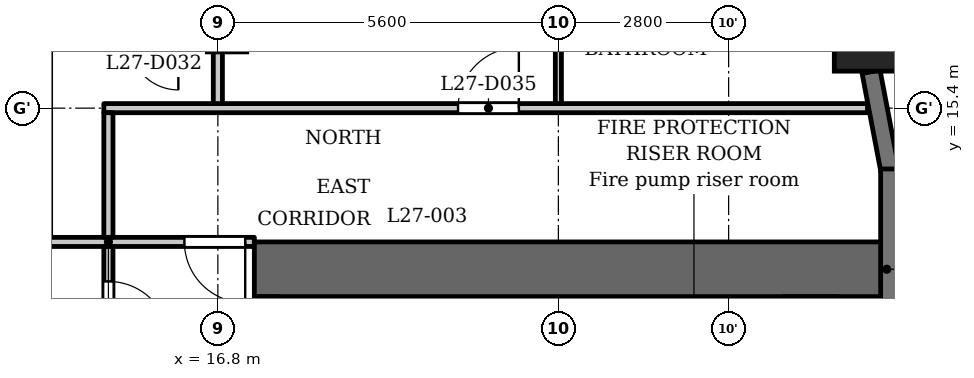
"""IFC4 building model, lengths in metres.
Left out: names, types, materials, properties, quantities, classifications, styles, units other than length and angle.
Written with IfcOpenShell. Run it as: python <this file> out.ifc"""

import sys

from ifc_helpers import new_model, si_unit, direction, frame, frame_2d, origin, origin_2d, place, context, subcontext, project, spatial, rectangle, extrude, element, fill, save


model = new_model("IFC4")
c1 = context("Model", 3, precision=1e-05, world=origin(), true_north=direction((0.0, 1.0)))
c2 = subcontext(c1, "Body", "Model", "MODEL_VIEW")
j1 = project(units=[si_unit("LENGTHUNIT", "METRE"), si_unit("PLANEANGLEUNIT", "RADIAN")], contexts=[c1])
p1 = place(None, origin())
s1 = spatial("IfcSite", under=j1, at=p1, CompositionType="ELEMENT")
p2 = place(p1, origin())
s2 = spatial("IfcBuilding", under=s1, at=p2, CompositionType="ELEMENT")
p3 = place(p2, frame((0.0, 0.0, 107.8)))
s3 = spatial("IfcBuildingStorey", under=s2, at=p3, CompositionType="ELEMENT", Elevation=107.8)
p4 = place(p3, frame((27.538, 16.609, 0.0), z_axis=(0.0, 0.0, 1.0), x_axis=(1.0, 0.0, 0.0)))
e1 = element("IfcColumn", 1, at=p4, inside=s3, PredefinedType="COLUMN", context=c2, shape_type="SweptSolid", body=[
    extrude(rectangle(XDim=1.2, YDim=1.2, at=origin_2d()), origin(), (0.0, 0.0, 1.0), 3.5),
])
p5 = place(p3, frame((16.8, 16.8, 0.0), z_axis=(0.0, 0.0, 1.0), x_axis=(1.0, 0.0, 0.0)))
e2 = element("IfcColumn", 2, at=p5, inside=s3, PredefinedType="COLUMN", context=c2, shape_type="SweptSolid", body=[
    extrude(rectangle(XDim=0.95, YDim=0.95, at=origin_2d()), origin(), (0.0, 0.0, 1.0), 3.5),
])
p6 = place(p3, frame((27.85, 11.8, 0.0), z_axis=(0.0, 0.0, 1.0), x_axis=(0.0, 1.0, 0.0)))
e3 = element("IfcWall", 3, at=p6, inside=s3, PredefinedType="SOLIDWALL", context=c2, shape_type="SweptSolid", body=[
    extrude(rectangle(XDim=2.6, YDim=0.3, at=frame_2d((1.3, 0.0))), origin(), (0.0, 0.0, 1.0), 2.4),
])
p7 = place(p3, frame((27.853, 14.372, 0.0), z_axis=(0.0, 0.0, 1.0), x_axis=(-0.187349172861, 0.982293381546, 0.0)))
e4 = element("IfcWall", 4, at=p7, inside=s3, PredefinedType="SOLIDWALL", context=c2, shape_type="SweptSolid", body=[
    extrude(rectangle(XDim=1.656, YDim=0.3, at=frame_2d((0.828, 0.0))), origin(), (0.0, 0.0, 1.0), 2.4),
])
p8 = place(p3, frame((17.4, 12.75, 0.0), z_axis=(0.0, 0.0, 1.0), x_axis=(1.0, 0.0, 0.0)))
e5 = element("IfcWall", 5, at=p8, inside=s3, PredefinedType="SHEAR", context=c2, shape_type="SweptSolid", body=[
    extrude(rectangle(XDim=10.4, YDim=0.9, at=frame_2d((5.2, 0.0))), origin(), (0.0, 0.0, 1.0), 3.2),
])
p9 = place(p3, frame((17.6, -12.3, 0.0), z_axis=(0.0, 0.0, 1.0), x_axis=(0.0, 1.0, 0.0)))
e6 = element("IfcWall", 6, at=p9, inside=s3, PredefinedType="SHEAR", context=c2, shape_type="SweptSolid", body=[
    extrude(rectangle(XDim=24.6, YDim=0.4, at=frame_2d((12.3, 0.0))), origin(), (0.0, 0.0, 1.0), 3.2),
])
p10 = place(p9, frame((6.0, 0.0, 0.0)))
e7 = element("IfcOpeningElement", 7, at=p10, cuts=e6, PredefinedType="OPENING", context=c2, shape_type="SweptSolid", body=[
    extrude(rectangle(XDim=1.1, YDim=2.1, at=frame_2d((0.55, 1.05))), frame((0.0, 0.21, 0.0), z_axis=(0.0, -1.0, 0.0), x_axis=(1.0, 0.0, 0.0)), (0.0, 0.0, 1.0), 0.42),
])
p11 = place(p9, frame((8.4, 0.0, 0.0)))
e8 = element("IfcOpeningElement", 8, at=p11, cuts=e6, PredefinedType="OPENING", context=c2, shape_type="SweptSolid", body=[
    extrude(rectangle(XDim=1.1, YDim=2.1, at=frame_2d((0.55, 1.05))), frame((0.0, 0.21, 0.0), z_axis=(0.0, -1.0, 0.0), x_axis=(1.0, 0.0, 0.0)), (0.0, 0.0, 1.0), 0.42),
])
p12 = place(p9, frame((10.8, 0.0, 0.0)))
e9 = element("IfcOpeningElement", 9, at=p12, cuts=e6, PredefinedType="OPENING", context=c2, shape_type="SweptSolid", body=[
    extrude(rectangle(XDim=1.1, YDim=2.1, at=frame_2d((0.55, 1.05))), frame((0.0, 0.21, 0.0), z_axis=(0.0, -1.0, 0.0), x_axis=(1.0, 0.0, 0.0)), (0.0, 0.0, 1.0), 0.42),
])
p13 = place(p9, frame((16.75, 0.0, 0.0)))
e10 = element("IfcOpeningElement", 10, at=p13, cuts=e6, PredefinedType="OPENING", context=c2, shape_type="SweptSolid", body=[
    extrude(rectangle(XDim=0.9, YDim=2.1, at=frame_2d((0.45, 1.05))), frame((0.0, 0.21, 0.0), z_axis=(0.0, -1.0, 0.0), x_axis=(1.0, 0.0, 0.0)), (0.0, 0.0, 1.0), 0.42),
])
p14 = place(p9, frame((22.8, 0.0, 0.0)))
e11 = element("IfcOpeningElement", 11, at=p14, cuts=e6, PredefinedType="OPENING", context=c2, shape_type="SweptSolid", body=[
    extrude(rectangle(XDim=1.1, YDim=2.1, at=frame_2d((0.55, 1.05))), frame((0.0, 0.21, 0.0), z_axis=(0.0, -1.0, 0.0), x_axis=(1.0, 0.0, 0.0)), (0.0, 0.0, 1.0), 0.42),
])
p15 = place(p9, frame((0.7, 0.0, 0.0)))
e12 = element("IfcOpeningElement", 12, at=p15, cuts=e6, PredefinedType="OPENING", context=c2, shape_type="SweptSolid", body=[
    extrude(rectangle(XDim=1.1, YDim=2.1, at=frame_2d((0.55, 1.05))), frame((0.0, 0.21, 0.0), z_axis=(0.0, -1.0, 0.0), x_axis=(1.0, 0.0, 0.0)), (0.0, 0.0, 1.0), 0.42),
])
p16 = place(p9, frame((12.775, 0.0, 0.0)))
e13 = element("IfcOpeningElement", 13, at=p16, cuts=e6, PredefinedType="OPENING", context=c2, shape_type="SweptSolid", body=[
    extrude(rectangle(XDim=1.8, YDim=2.1, at=frame_2d((0.9, 1.05))), frame((0.0, 0.21, 0.0), z_axis=(0.0, -1.0, 0.0), x_axis=(1.0, 0.0, 0.0)), (0.0, 0.0, 1.0), 0.42),
])
p17 = place(p3, frame((26.55, -12.3, 0.0), z_axis=(0.0, 0.0, 1.0), x_axis=(0.0, 1.0, 0.0)))
e14 = element("IfcWall", 14, at=p17, inside=s3, PredefinedType="SHEAR", context=c2, shape_type="SweptSolid", body=[
    extrude(rectangle(XDim=24.6, YDim=0.9, at=frame_2d((12.3, 0.0))), origin(), (0.0, 0.0, 1.0), 3.2),
])
p18 = place(p3, frame((23.55, 9.8, 0.0), z_axis=(0.0, 0.0, 1.0), x_axis=(0.0, 1.0, 0.0)))
e15 = element("IfcWall", 15, at=p18, inside=s3, PredefinedType="PARTITIONING", context=c2, shape_type="SweptSolid", body=[
    extrude(rectangle(XDim=2.5, YDim=0.2, at=frame_2d((1.25, 0.0))), origin(), (0.0, 0.0, 1.0), 3.2),
])
p19 = place(p18, frame((0.8, 0.0, 0.0)))
e16 = element("IfcOpeningElement", 16, at=p19, cuts=e15, PredefinedType="OPENING", context=c2, shape_type="SweptSolid", body=[
    extrude(rectangle(XDim=0.9, YDim=2.1, at=frame_2d((0.45, 1.05))), frame((0.0, 0.11, 0.0), z_axis=(0.0, -1.0, 0.0), x_axis=(1.0, 0.0, 0.0)), (0.0, 0.0, 1.0), 0.22),
])
p20 = place(p3, frame((-17.4, 13.2, 0.0), z_axis=(0.0, 0.0, 1.0), x_axis=(1.0, 0.0, 0.0)))
e17 = element("IfcWall", 17, at=p20, inside=s3, PredefinedType="PARTITIONING", context=c2, shape_type="SweptSolid", body=[
    extrude(rectangle(XDim=34.8, YDim=0.15, at=frame_2d((17.4, 0.0))), origin(), (0.0, 0.0, 1.0), 3.2),
])
p21 = place(p20, frame((0.25, 0.0, 0.0)))
e18 = element("IfcOpeningElement", 18, at=p21, cuts=e17, PredefinedType="OPENING", context=c2, shape_type="SweptSolid", body=[
    extrude(rectangle(XDim=1.0, YDim=2.1, at=frame_2d((0.5, 1.05))), frame((0.0, 0.085, 0.0), z_axis=(0.0, -1.0, 0.0), x_axis=(1.0, 0.0, 0.0)), (0.0, 0.0, 1.0), 0.17),
])
p22 = place(p20, frame((33.65, 0.0, 0.0)))
e19 = element("IfcOpeningElement", 19, at=p22, cuts=e17, PredefinedType="OPENING", context=c2, shape_type="SweptSolid", body=[
    extrude(rectangle(XDim=1.0, YDim=2.1, at=frame_2d((0.5, 1.05))), frame((0.0, 0.085, 0.0), z_axis=(0.0, -1.0, 0.0), x_axis=(1.0, 0.0, 0.0)), (0.0, 0.0, 1.0), 0.17),
])
p23 = place(p20, frame((4.55, 0.0, 0.0)))
e20 = element("IfcOpeningElement", 20, at=p23, cuts=e17, PredefinedType="OPENING", context=c2, shape_type="SweptSolid", body=[
    extrude(rectangle(XDim=1.0, YDim=2.1, at=frame_2d((0.5, 1.05))), frame((0.0, 0.085, 0.0), z_axis=(0.0, -1.0, 0.0), x_axis=(1.0, 0.0, 0.0)), (0.0, 0.0, 1.0), 0.17),
])
p24 = place(p20, frame((6.85, 0.0, 0.0)))
e21 = element("IfcOpeningElement", 21, at=p24, cuts=e17, PredefinedType="OPENING", context=c2, shape_type="SweptSolid", body=[
    extrude(rectangle(XDim=1.0, YDim=2.1, at=frame_2d((0.5, 1.05))), frame((0.0, 0.085, 0.0), z_axis=(0.0, -1.0, 0.0), x_axis=(1.0, 0.0, 0.0)), (0.0, 0.0, 1.0), 0.17),
])
p25 = place(p20, frame((12.5, 0.0, 0.0)))
e22 = element("IfcOpeningElement", 22, at=p25, cuts=e17, PredefinedType="OPENING", context=c2, shape_type="SweptSolid", body=[
    extrude(rectangle(XDim=1.0, YDim=2.1, at=frame_2d((0.5, 1.05))), frame((0.0, 0.085, 0.0), z_axis=(0.0, -1.0, 0.0), x_axis=(1.0, 0.0, 0.0)), (0.0, 0.0, 1.0), 0.17),
])
p26 = place(p20, frame((25.7, 0.0, 0.0)))
e23 = element("IfcOpeningElement", 23, at=p26, cuts=e17, PredefinedType="OPENING", context=c2, shape_type="SweptSolid", body=[
    extrude(rectangle(XDim=1.0, YDim=2.1, at=frame_2d((0.5, 1.05))), frame((0.0, 0.085, 0.0), z_axis=(0.0, -1.0, 0.0), x_axis=(1.0, 0.0, 0.0)), (0.0, 0.0, 1.0), 0.17),
])
p27 = place(p20, frame((29.75, 0.0, 0.0)))
e24 = element("IfcOpeningElement", 24, at=p27, cuts=e17, PredefinedType="OPENING", context=c2, shape_type="SweptSolid", body=[
    extrude(rectangle(XDim=1.0, YDim=2.1, at=frame_2d((0.5, 1.05))), frame((0.0, 0.085, 0.0), z_axis=(0.0, -1.0, 0.0), x_axis=(1.0, 0.0, 0.0)), (0.0, 0.0, 1.0), 0.17),
])
p28 = place(p3, frame((14.925, 15.4, 0.0), z_axis=(0.0, 0.0, 1.0), x_axis=(1.0, 0.0, 0.0)))
e25 = element("IfcWall", 25, at=p28, inside=s3, PredefinedType="PARTITIONING", context=c2, shape_type="SweptSolid", body=[
    extrude(rectangle(XDim=12.559, YDim=0.15, at=frame_2d((6.279, 0.0))), origin(), (0.0, 0.0, 1.0), 3.2),
])
p29 = place(p28, frame((5.825, 0.0, 0.0)))
e26 = element("IfcOpeningElement", 26, at=p29, cuts=e25, PredefinedType="OPENING", context=c2, shape_type="SweptSolid", body=[
    extrude(rectangle(XDim=1.0, YDim=2.1, at=frame_2d((0.5, 1.05))), frame((0.0, 0.085, 0.0), z_axis=(0.0, -1.0, 0.0), x_axis=(1.0, 0.0, 0.0)), (0.0, 0.0, 1.0), 0.17),
])
p30 = place(p3, frame((15.0, 6.769, 0.0), z_axis=(0.0, 0.0, 1.0), x_axis=(0.0, 1.0, 0.0)))
e27 = element("IfcWall", 27, at=p30, inside=s3, PredefinedType="PARTITIONING", context=c2, shape_type="SweptSolid", body=[
    extrude(rectangle(XDim=6.356, YDim=0.15, at=frame_2d((3.178, 0.0))), origin(), (0.0, 0.0, 1.0), 3.2),
])
p31 = place(p30, frame((4.781, 0.0, 0.0)))
e28 = element("IfcOpeningElement", 28, at=p31, cuts=e27, PredefinedType="OPENING", context=c2, shape_type="SweptSolid", body=[
    extrude(rectangle(XDim=1.0, YDim=2.1, at=frame_2d((0.5, 1.05))), frame((0.0, 0.085, 0.0), z_axis=(0.0, -1.0, 0.0), x_axis=(1.0, 0.0, 0.0)), (0.0, 0.0, 1.0), 0.17),
])
p32 = place(p3, frame((15.0, 13.275, 0.0), z_axis=(0.0, 0.0, 1.0), x_axis=(0.0, 1.0, 0.0)))
e29 = element("IfcWall", 29, at=p32, inside=s3, PredefinedType="PARTITIONING", context=c2, shape_type="SweptSolid", body=[
    extrude(rectangle(XDim=2.05, YDim=0.15, at=frame_2d((1.025, 0.0))), origin(), (0.0, 0.0, 1.0), 3.2),
])
p33 = place(p3, frame((16.8, 15.475, 0.0), z_axis=(0.0, 0.0, 1.0), x_axis=(0.0, 1.0, 0.0)))
e30 = element("IfcWall", 30, at=p33, inside=s3, PredefinedType="PARTITIONING", context=c2, shape_type="SweptSolid", body=[
    extrude(rectangle(XDim=7.505, YDim=0.15, at=frame_2d((3.752, 0.0))), origin(), (0.0, 0.0, 1.0), 3.2),
])
p34 = place(p3, frame((22.4, 15.475, 0.0), z_axis=(0.0, 0.0, 1.0), x_axis=(0.0, 1.0, 0.0)))
e31 = element("IfcWall", 31, at=p34, inside=s3, PredefinedType="PARTITIONING", context=c2, shape_type="SweptSolid", body=[
    extrude(rectangle(XDim=2.575, YDim=0.1, at=frame_2d((1.288, 0.0))), origin(), (0.0, 0.0, 1.0), 3.2),
])
p35 = place(p31, origin())
e32 = element("IfcDoor", 32, at=p35, inside=s3, OperationType="SINGLE_SWING_LEFT", PredefinedType="DOOR", context=c2, shape_type="SweptSolid", body=[
    extrude(rectangle(XDim=1.0, YDim=2.1, at=frame_2d((0.5, 1.05))), frame((0.0, 0.025, 0.0), z_axis=(0.0, -1.0, 0.0), x_axis=(1.0, 0.0, 0.0)), (0.0, 0.0, 1.0), 0.05),
])
fill(e28, e32)
p36 = place(p22, origin())
e33 = element("IfcDoor", 33, at=p36, inside=s3, OperationType="SINGLE_SWING_RIGHT", PredefinedType="DOOR", context=c2, shape_type="SweptSolid", body=[
    extrude(rectangle(XDim=1.0, YDim=2.1, at=frame_2d((0.5, 1.05))), frame((0.0, 0.025, 0.0), z_axis=(0.0, -1.0, 0.0), x_axis=(1.0, 0.0, 0.0)), (0.0, 0.0, 1.0), 0.05),
])
fill(e19, e33)
p37 = place(p29, origin())
e34 = element("IfcDoor", 34, at=p37, inside=s3, OperationType="SINGLE_SWING_LEFT", PredefinedType="DOOR", context=c2, shape_type="SweptSolid", body=[
    extrude(rectangle(XDim=1.0, YDim=2.1, at=frame_2d((0.5, 1.05))), frame((0.0, 0.025, 0.0), z_axis=(0.0, -1.0, 0.0), x_axis=(1.0, 0.0, 0.0)), (0.0, 0.0, 1.0), 0.05),
])
fill(e26, e34)
save(model, sys.argv[1])
